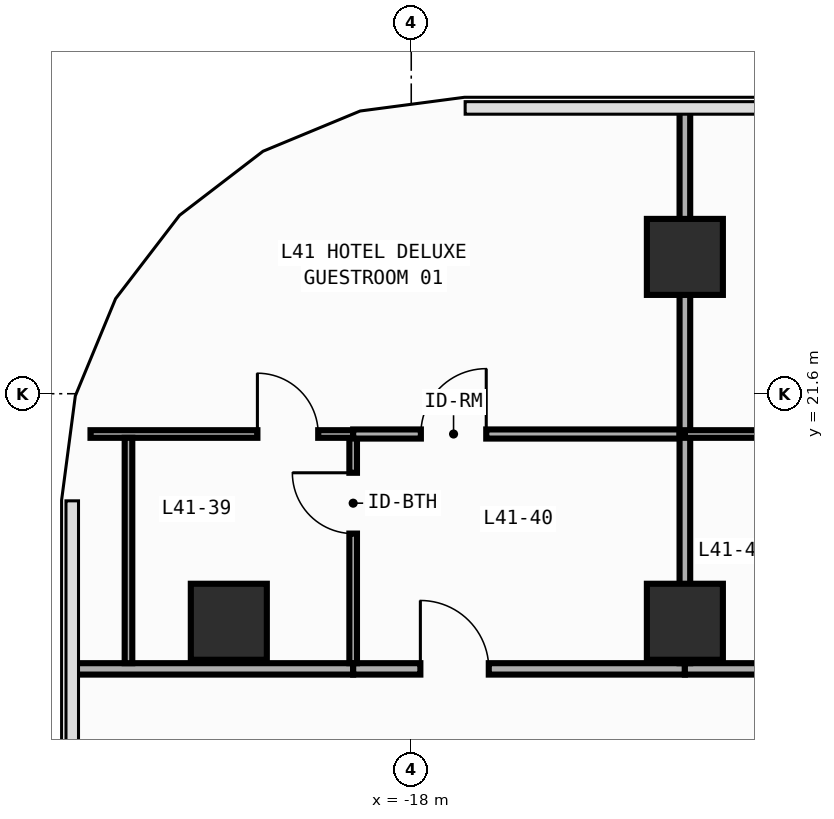
"""IFC4 building model, lengths in metres.
Left out: names, types, materials, properties, quantities, classifications, styles, units other than length and angle.
Written with IfcOpenShell. Run it as: python <this file> out.ifc"""

import sys

from ifc_helpers import new_model, si_unit, direction, frame, frame_2d, origin, origin_2d, place, context, subcontext, project, spatial, rectangle, extrude, element, fill, save


model = new_model("IFC4")
c1 = context("Model", 3, precision=1e-05, world=origin(), true_north=direction((0.0, 1.0)))
c2 = subcontext(c1, "Body", "Model", "MODEL_VIEW")
j1 = project(units=[si_unit("LENGTHUNIT", "METRE"), si_unit("PLANEANGLEUNIT", "RADIAN")], contexts=[c1])
p1 = place(None, origin())
s1 = spatial("IfcSite", under=j1, at=p1, CompositionType="ELEMENT")
p2 = place(p1, origin())
s2 = spatial("IfcBuilding", under=s1, at=p2, CompositionType="ELEMENT")
p3 = place(p2, frame((0.0, 0.0, 180.2)))
s3 = spatial("IfcBuildingStorey", under=s2, at=p3, CompositionType="ELEMENT", Elevation=180.2)
for number, where, z_axis, x_axis in (
    (1, (-20.4, 18.6, 0.0), (0.0, 0.0, 1.0), (1.0, 0.0, 0.0)),
    (2, (-14.4, 18.6, 0.0), (0.0, 0.0, 1.0), (1.0, 0.0, 0.0)),
    (3, (-14.4, 23.4, 0.0), (0.0, 0.0, 1.0), (1.0, 0.0, 0.0)),
):
    element("IfcColumn", number, at=place(p3, frame(where, z_axis=z_axis, x_axis=x_axis)), inside=s3, PredefinedType="COLUMN", context=c2, shape_type="SweptSolid", body=[
        extrude(rectangle(XDim=1.0, YDim=1.0, at=origin_2d()), origin(), (0.0, 0.0, 1.0), 3.8),
    ])
p4 = place(p3, frame((-22.455, 17.98, 0.0), z_axis=(0.0, 0.0, 1.0), x_axis=(1.0, 0.0, 0.0)))
e4 = element("IfcWall", 4, at=p4, inside=s3, PredefinedType="PARTITIONING", context=c2, shape_type="SweptSolid", body=[
    extrude(rectangle(XDim=3.691, YDim=0.15, at=frame_2d((1.846, 0.0))), origin(), (0.0, 0.0, 1.0), 3.54),
])
p5 = place(p3, frame((-18.764, 17.98, 0.0), z_axis=(0.0, 0.0, 1.0), x_axis=(1.0, 0.0, 0.0)))
e5 = element("IfcWall", 5, at=p5, inside=s3, PredefinedType="PARTITIONING", context=c2, shape_type="SweptSolid", body=[
    extrude(rectangle(XDim=4.364, YDim=0.15, at=frame_2d((2.182, 0.0))), origin(), (0.0, 0.0, 1.0), 3.54),
])
p6 = place(p5, frame((0.884, 0.0, 0.0)))
e6 = element("IfcOpeningElement", 6, at=p6, cuts=e5, PredefinedType="OPENING", context=c2, shape_type="SweptSolid", body=[
    extrude(rectangle(XDim=0.9, YDim=2.15, at=frame_2d((0.45, 1.075))), frame((0.0, 0.085, 0.0), z_axis=(0.0, -1.0, 0.0), x_axis=(1.0, 0.0, 0.0)), (0.0, 0.0, 1.0), 0.17),
])
p7 = place(p3, frame((-14.4, 17.98, 0.0), z_axis=(0.0, 0.0, 1.0), x_axis=(1.0, 0.0, 0.0)))
e7 = element("IfcWall", 7, at=p7, inside=s3, PredefinedType="PARTITIONING", context=c2, shape_type="SweptSolid", body=[
    extrude(rectangle(XDim=2.655, YDim=0.15, at=frame_2d((1.327, 0.0))), origin(), (0.0, 0.0, 1.0), 3.54),
])
p8 = place(p3, frame((-18.764, 18.055, 0.0), z_axis=(0.0, 0.0, 1.0), x_axis=(0.0, 1.0, 0.0)))
e8 = element("IfcWall", 8, at=p8, inside=s3, PredefinedType="PARTITIONING", context=c2, shape_type="SweptSolid", body=[
    extrude(rectangle(XDim=2.965, YDim=0.1, at=frame_2d((1.482, 0.0))), origin(), (0.0, 0.0, 1.0), 3.54),
])
p9 = place(p8, frame((1.705, 0.0, 0.0)))
e9 = element("IfcOpeningElement", 9, at=p9, cuts=e8, PredefinedType="OPENING", context=c2, shape_type="SweptSolid", body=[
    extrude(rectangle(XDim=0.8, YDim=2.1, at=frame_2d((0.4, 1.05))), frame((0.0, 0.06, 0.0), z_axis=(0.0, -1.0, 0.0), x_axis=(1.0, 0.0, 0.0)), (0.0, 0.0, 1.0), 0.12),
])
p10 = place(p3, frame((-22.22, 21.07, 0.0), z_axis=(0.0, 0.0, 1.0), x_axis=(1.0, 0.0, 0.0)))
e10 = element("IfcWall", 10, at=p10, inside=s3, PredefinedType="PARTITIONING", context=c2, shape_type="SweptSolid", body=[
    extrude(rectangle(XDim=3.456, YDim=0.1, at=frame_2d((1.728, 0.0))), origin(), (0.0, 0.0, 1.0), 3.54),
])
p11 = place(p10, frame((2.196, 0.0, 0.0)))
e11 = element("IfcOpeningElement", 11, at=p11, cuts=e10, PredefinedType="OPENING", context=c2, shape_type="SweptSolid", body=[
    extrude(rectangle(XDim=0.8, YDim=2.1, at=frame_2d((0.4, 1.05))), frame((0.0, 0.06, 0.0), z_axis=(0.0, -1.0, 0.0), x_axis=(1.0, 0.0, 0.0)), (0.0, 0.0, 1.0), 0.12),
])
p12 = place(p3, frame((-18.764, 21.07, 0.0), z_axis=(0.0, 0.0, 1.0), x_axis=(1.0, 0.0, 0.0)))
e12 = element("IfcWall", 12, at=p12, inside=s3, PredefinedType="PARTITIONING", context=c2, shape_type="SweptSolid", body=[
    extrude(rectangle(XDim=4.364, YDim=0.12, at=frame_2d((2.182, 0.0))), origin(), (0.0, 0.0, 1.0), 3.54),
])
p13 = place(p12, frame((0.891, 0.0, 0.0)))
e13 = element("IfcOpeningElement", 13, at=p13, cuts=e12, PredefinedType="OPENING", context=c2, shape_type="SweptSolid", body=[
    extrude(rectangle(XDim=0.86, YDim=2.15, at=frame_2d((0.43, 1.075))), frame((0.0, 0.07, 0.0), z_axis=(0.0, -1.0, 0.0), x_axis=(1.0, 0.0, 0.0)), (0.0, 0.0, 1.0), 0.14),
])
p14 = place(p3, frame((-14.4, 18.055, 0.0), z_axis=(0.0, 0.0, 1.0), x_axis=(0.0, 1.0, 0.0)))
e14 = element("IfcWall", 14, at=p14, inside=s3, PredefinedType="PARTITIONING", context=c2, shape_type="SweptSolid", body=[
    extrude(rectangle(XDim=3.015, YDim=0.14, at=frame_2d((1.508, 0.0))), origin(), (0.0, 0.0, 1.0), 2.952),
])
p15 = place(p3, frame((-14.4, 21.07, 0.0), z_axis=(0.0, 0.0, 1.0), x_axis=(0.0, 1.0, 0.0)))
e15 = element("IfcWall", 15, at=p15, inside=s3, PredefinedType="PARTITIONING", context=c2, shape_type="SweptSolid", body=[
    extrude(rectangle(XDim=4.285, YDim=0.14, at=frame_2d((2.143, 0.0))), origin(), (0.0, 0.0, 1.0), 2.952),
])
p16 = place(p3, frame((-14.4, 21.07, 0.0), z_axis=(0.0, 0.0, 1.0), x_axis=(1.0, 0.0, 0.0)))
e16 = element("IfcWall", 16, at=p16, inside=s3, PredefinedType="PARTITIONING", context=c2, shape_type="SweptSolid", body=[
    extrude(rectangle(XDim=2.655, YDim=0.1, at=frame_2d((1.327, 0.0))), origin(), (0.0, 0.0, 1.0), 3.54),
])
p17 = place(p16, frame((1.395, 0.0, 0.0)))
e17 = element("IfcOpeningElement", 17, at=p17, cuts=e16, PredefinedType="OPENING", context=c2, shape_type="SweptSolid", body=[
    extrude(rectangle(XDim=0.8, YDim=2.1, at=frame_2d((0.4, 1.05))), frame((0.0, 0.06, 0.0), z_axis=(0.0, -1.0, 0.0), x_axis=(1.0, 0.0, 0.0)), (0.0, 0.0, 1.0), 0.12),
])
p18 = place(p3, frame((-21.72, 18.055, 0.0), z_axis=(0.0, 0.0, 1.0), x_axis=(0.0, 1.0, 0.0)))
e18 = element("IfcWall", 18, at=p18, inside=s3, PredefinedType="PARTITIONING", context=c2, shape_type="SweptSolid", body=[
    extrude(rectangle(XDim=2.965, YDim=0.1, at=frame_2d((1.482, 0.0))), origin(), (0.0, 0.0, 1.0), 3.54),
])
p19 = place(p6, origin())
e19 = element("IfcDoor", 19, at=p19, inside=s3, OperationType="SINGLE_SWING_LEFT", PredefinedType="DOOR", context=c2, shape_type="SweptSolid", body=[
    extrude(rectangle(XDim=0.9, YDim=2.15, at=frame_2d((0.45, 1.075))), frame((0.0, 0.025, 0.0), z_axis=(0.0, -1.0, 0.0), x_axis=(1.0, 0.0, 0.0)), (0.0, 0.0, 1.0), 0.05),
])
fill(e6, e19)
p20 = place(p9, origin())
e20 = element("IfcDoor", 20, at=p20, inside=s3, OperationType="SINGLE_SWING_RIGHT", PredefinedType="DOOR", context=c2, shape_type="SweptSolid", body=[
    extrude(rectangle(XDim=0.8, YDim=2.1, at=frame_2d((0.4, 1.05))), frame((0.0, 0.025, 0.0), z_axis=(0.0, -1.0, 0.0), x_axis=(1.0, 0.0, 0.0)), (0.0, 0.0, 1.0), 0.05),
])
fill(e9, e20)
p21 = place(p11, origin())
e21 = element("IfcDoor", 21, at=p21, inside=s3, OperationType="SINGLE_SWING_LEFT", PredefinedType="DOOR", context=c2, shape_type="SweptSolid", body=[
    extrude(rectangle(XDim=0.8, YDim=2.1, at=frame_2d((0.4, 1.05))), frame((0.0, 0.025, 0.0), z_axis=(0.0, -1.0, 0.0), x_axis=(1.0, 0.0, 0.0)), (0.0, 0.0, 1.0), 0.05),
])
fill(e11, e21)
p22 = place(p13, origin())
e22 = element("IfcDoor", 22, at=p22, inside=s3, OperationType="SINGLE_SWING_RIGHT", PredefinedType="DOOR", context=c2, shape_type="SweptSolid", body=[
    extrude(rectangle(XDim=0.86, YDim=2.15, at=frame_2d((0.43, 1.075))), frame((0.0, 0.025, 0.0), z_axis=(0.0, -1.0, 0.0), x_axis=(1.0, 0.0, 0.0)), (0.0, 0.0, 1.0), 0.05),
])
fill(e13, e22)
save(model, sys.argv[1])
